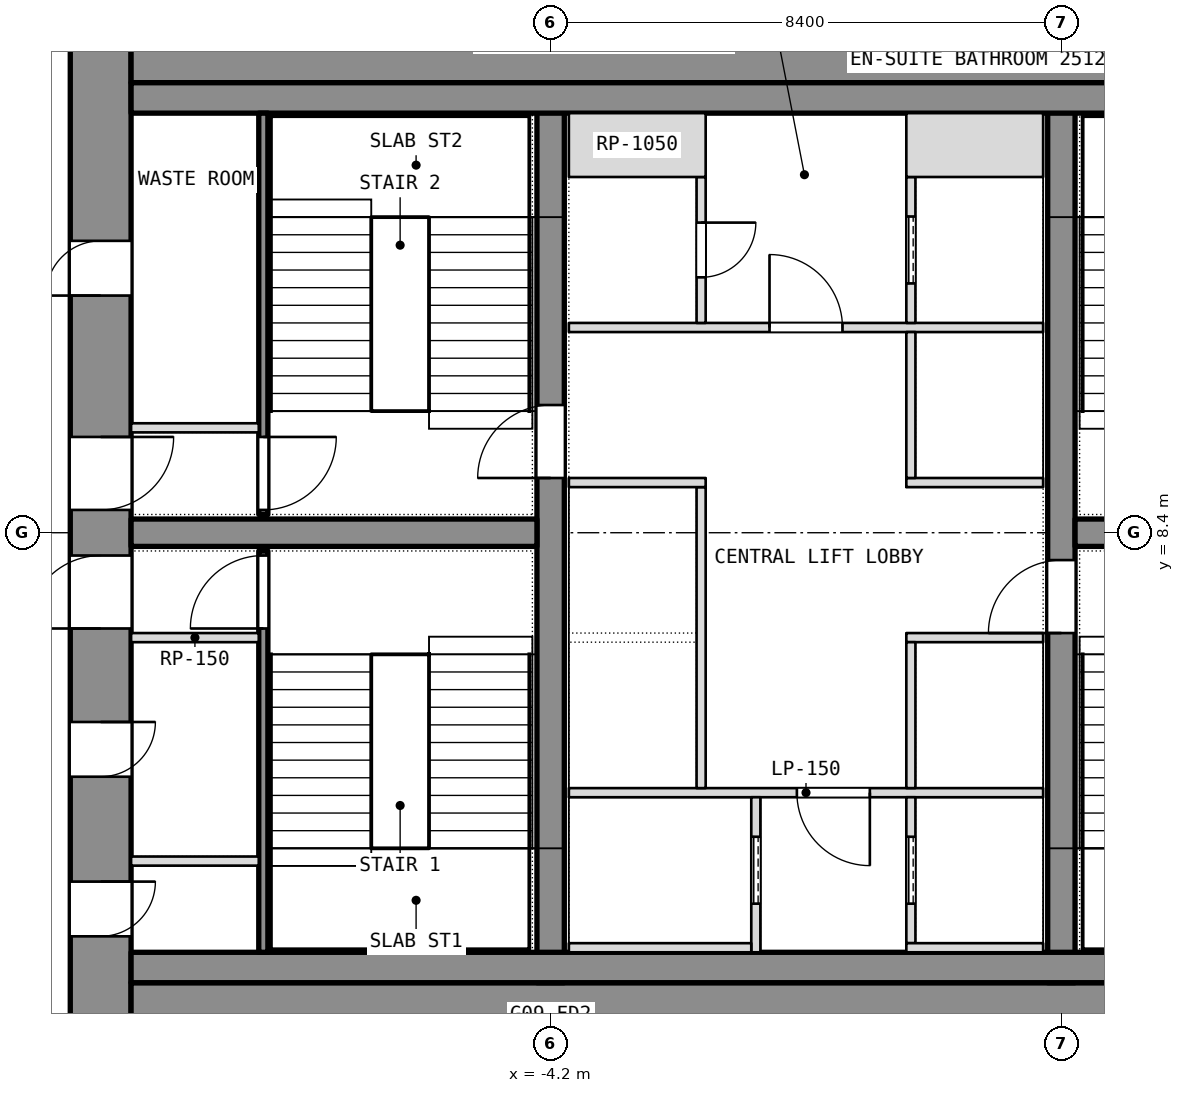
"""IFC4 building model, lengths in metres.
Left out: names, types, materials, properties, quantities, classifications, styles, units other than length and angle.
Written with IfcOpenShell. Run it as: python <this file> out.ifc"""

import sys

from ifc_helpers import new_model, si_unit, direction, frame, frame_2d, origin, place, context, subcontext, project, spatial, rectangle, extrude, element, fill, save


model = new_model("IFC4")
c1 = context("Model", 3, precision=1e-05, world=origin(), true_north=direction((0.0, 1.0)))
c2 = subcontext(c1, "Body", "Model", "MODEL_VIEW")
j1 = project(units=[si_unit("LENGTHUNIT", "METRE"), si_unit("PLANEANGLEUNIT", "RADIAN")], contexts=[c1])
p1 = place(None, origin())
s1 = spatial("IfcSite", under=j1, at=p1, CompositionType="ELEMENT")
p2 = place(p1, origin())
s2 = spatial("IfcBuilding", under=s1, at=p2, CompositionType="ELEMENT")
p3 = place(p2, frame((0.0, 0.0, 115.7)))
s3 = spatial("IfcBuildingStorey", under=s2, at=p3, CompositionType="ELEMENT", Elevation=115.7)
p4 = place(p3, frame((-11.6, 0.0, 0.0), z_axis=(0.0, 0.0, 1.0), x_axis=(0.0, 1.0, 0.0)))
e1 = element("IfcWall", 1, at=p4, inside=s3, PredefinedType="SHEAR", context=c2, shape_type="SweptSolid", body=[
    extrude(rectangle(XDim=16.8, YDim=1.0, at=frame_2d((8.4, 0.0))), origin(), (0.0, 0.0, 1.0), 3.6),
])
p5 = place(p4, frame((1.762, 0.0, 0.0)))
e2 = element("IfcOpeningElement", 2, at=p5, cuts=e1, PredefinedType="OPENING", context=c2, shape_type="SweptSolid", body=[
    extrude(rectangle(XDim=0.9, YDim=2.1, at=frame_2d((0.45, 1.05))), frame((0.0, 0.5, 0.0), z_axis=(0.0, -1.0, 0.0), x_axis=(1.0, 0.0, 0.0)), (0.0, 0.0, 1.0), 1.0),
])
p6 = place(p4, frame((4.387, 0.0, 0.0)))
e3 = element("IfcOpeningElement", 3, at=p6, cuts=e1, PredefinedType="OPENING", context=c2, shape_type="SweptSolid", body=[
    extrude(rectangle(XDim=0.9, YDim=2.1, at=frame_2d((0.45, 1.05))), frame((0.0, 0.5, 0.0), z_axis=(0.0, -1.0, 0.0), x_axis=(1.0, 0.0, 0.0)), (0.0, 0.0, 1.0), 1.0),
])
p7 = place(p4, frame((6.825, 0.0, 0.0)))
e4 = element("IfcOpeningElement", 4, at=p7, cuts=e1, PredefinedType="OPENING", context=c2, shape_type="SweptSolid", body=[
    extrude(rectangle(XDim=1.2, YDim=2.1, at=frame_2d((0.6, 1.05))), frame((0.0, 0.5, 0.0), z_axis=(0.0, -1.0, 0.0), x_axis=(1.0, 0.0, 0.0)), (0.0, 0.0, 1.0), 1.0),
])
p8 = place(p4, frame((12.3, 0.0, 0.0)))
e5 = element("IfcOpeningElement", 5, at=p8, cuts=e1, PredefinedType="OPENING", context=c2, shape_type="SweptSolid", body=[
    extrude(rectangle(XDim=0.9, YDim=2.1, at=frame_2d((0.45, 1.05))), frame((0.0, 0.5, 0.0), z_axis=(0.0, -1.0, 0.0), x_axis=(1.0, 0.0, 0.0)), (0.0, 0.0, 1.0), 1.0),
])
p9 = place(p4, frame((8.775, 0.0, 0.0)))
e6 = element("IfcOpeningElement", 6, at=p9, cuts=e1, PredefinedType="OPENING", context=c2, shape_type="SweptSolid", body=[
    extrude(rectangle(XDim=1.2, YDim=2.1, at=frame_2d((0.6, 1.05))), frame((0.0, 0.5, 0.0), z_axis=(0.0, -1.0, 0.0), x_axis=(1.0, 0.0, 0.0)), (0.0, 0.0, 1.0), 1.0),
])
for number, where, z_axis, x_axis in (
    (7, (-11.1, 0.5, 0.0), (0.0, 0.0, 1.0), (1.0, 0.0, 0.0)),
    (8, (-11.1, 16.3, 0.0), (0.0, 0.0, 1.0), (1.0, 0.0, 0.0)),
):
    element("IfcWall", number, at=place(p3, frame(where, z_axis=z_axis, x_axis=x_axis)), inside=s3, PredefinedType="SHEAR", context=c2, shape_type="SweptSolid", body=[
        extrude(rectangle(XDim=22.2, YDim=1.0, at=frame_2d((11.1, 0.0))), origin(), (0.0, 0.0, 1.0), 3.6),
    ])
p10 = place(p3, frame((-4.2, 1.0, 0.0), z_axis=(0.0, 0.0, 1.0), x_axis=(0.0, 1.0, 0.0)))
e9 = element("IfcWall", 9, at=p10, inside=s3, PredefinedType="SHEAR", context=c2, shape_type="SweptSolid", body=[
    extrude(rectangle(XDim=14.8, YDim=0.45, at=frame_2d((7.4, 0.0))), origin(), (0.0, 0.0, 1.0), 3.6),
])
p11 = place(p10, frame((8.3, 0.0, 0.0)))
e10 = element("IfcOpeningElement", 10, at=p11, cuts=e9, PredefinedType="OPENING", context=c2, shape_type="SweptSolid", body=[
    extrude(rectangle(XDim=1.2, YDim=2.1, at=frame_2d((0.6, 1.05))), frame((0.0, 0.225, 0.0), z_axis=(0.0, -1.0, 0.0), x_axis=(1.0, 0.0, 0.0)), (0.0, 0.0, 1.0), 0.45),
])
p12 = place(p3, frame((4.2, 1.0, 0.0), z_axis=(0.0, 0.0, 1.0), x_axis=(0.0, 1.0, 0.0)))
e11 = element("IfcWall", 11, at=p12, inside=s3, PredefinedType="SHEAR", context=c2, shape_type="SweptSolid", body=[
    extrude(rectangle(XDim=14.8, YDim=0.45, at=frame_2d((7.4, 0.0))), origin(), (0.0, 0.0, 1.0), 3.6),
])
p13 = place(p12, frame((5.75, 0.0, 0.0)))
e12 = element("IfcOpeningElement", 12, at=p13, cuts=e11, PredefinedType="OPENING", context=c2, shape_type="SweptSolid", body=[
    extrude(rectangle(XDim=1.2, YDim=2.1, at=frame_2d((0.6, 1.05))), frame((0.0, 0.225, 0.0), z_axis=(0.0, -1.0, 0.0), x_axis=(1.0, 0.0, 0.0)), (0.0, 0.0, 1.0), 0.45),
])
for number, where, z_axis, x_axis in (
    (13, (-11.1, 8.4, 0.0), (0.0, 0.0, 1.0), (1.0, 0.0, 0.0)),
    (14, (4.425, 8.4, 0.0), (0.0, 0.0, 1.0), (1.0, 0.0, 0.0)),
):
    element("IfcWall", number, at=place(p3, frame(where, z_axis=z_axis, x_axis=x_axis)), inside=s3, PredefinedType="SHEAR", context=c2, shape_type="SweptSolid", body=[
        extrude(rectangle(XDim=6.675, YDim=0.45, at=frame_2d((3.337, 0.0))), origin(), (0.0, 0.0, 1.0), 3.6),
    ])
for number, where, z_axis, x_axis in (
    (15, (-11.1, 1.25, 0.0), (0.0, 0.0, 1.0), (1.0, 0.0, 0.0)),
    (16, (-11.1, 15.55, 0.0), (0.0, 0.0, 1.0), (1.0, 0.0, 0.0)),
):
    element("IfcWall", number, at=place(p3, frame(where, z_axis=z_axis, x_axis=x_axis)), inside=s3, PredefinedType="PARTITIONING", context=c2, shape_type="SweptSolid", body=[
        extrude(rectangle(XDim=22.2, YDim=0.5, at=frame_2d((11.1, 0.0))), origin(), (0.0, 0.0, 1.0), 3.34),
    ])
p14 = place(p3, frame((-8.925, 1.5, 0.0), z_axis=(0.0, 0.0, 1.0), x_axis=(0.0, 1.0, 0.0)))
e17 = element("IfcWall", 17, at=p14, inside=s3, PredefinedType="SHEAR", context=c2, shape_type="SweptSolid", body=[
    extrude(rectangle(XDim=6.6, YDim=0.15, at=frame_2d((3.3, 0.0))), origin(), (0.0, 0.0, 1.0), 3.34),
])
p15 = place(p14, frame((5.325, 0.0, 0.0)))
e18 = element("IfcOpeningElement", 18, at=p15, cuts=e17, PredefinedType="OPENING", context=c2, shape_type="SweptSolid", body=[
    extrude(rectangle(XDim=1.2, YDim=2.1, at=frame_2d((0.6, 1.05))), frame((0.0, 0.075, 0.0), z_axis=(0.0, -1.0, 0.0), x_axis=(1.0, 0.0, 0.0)), (0.0, 0.0, 1.0), 0.15),
])
for number, where, z_axis, x_axis in (
    (19, (-11.1, 6.675, 0.0), (0.0, 0.0, 1.0), (1.0, 0.0, 0.0)),
    (20, (-11.1, 3.0, 0.0), (0.0, 0.0, 1.0), (1.0, 0.0, 0.0)),
):
    element("IfcWall", number, at=place(p3, frame(where, z_axis=z_axis, x_axis=x_axis)), inside=s3, PredefinedType="PARTITIONING", context=c2, shape_type="SweptSolid", body=[
        extrude(rectangle(XDim=2.1, YDim=0.15, at=frame_2d((1.05, 0.0))), origin(), (0.0, 0.0, 1.0), 3.34),
    ])
p16 = place(p3, frame((-8.925, 8.7, 0.0), z_axis=(0.0, 0.0, 1.0), x_axis=(0.0, 1.0, 0.0)))
e21 = element("IfcWall", 21, at=p16, inside=s3, PredefinedType="SHEAR", context=c2, shape_type="SweptSolid", body=[
    extrude(rectangle(XDim=6.6, YDim=0.15, at=frame_2d((3.3, 0.0))), origin(), (0.0, 0.0, 1.0), 3.34),
])
p17 = place(p16, frame((0.075, 0.0, 0.0)))
e22 = element("IfcOpeningElement", 22, at=p17, cuts=e21, PredefinedType="OPENING", context=c2, shape_type="SweptSolid", body=[
    extrude(rectangle(XDim=1.2, YDim=2.1, at=frame_2d((0.6, 1.05))), frame((0.0, 0.075, 0.0), z_axis=(0.0, -1.0, 0.0), x_axis=(1.0, 0.0, 0.0)), (0.0, 0.0, 1.0), 0.15),
])
p18 = place(p3, frame((-11.1, 10.125, 0.0), z_axis=(0.0, 0.0, 1.0), x_axis=(1.0, 0.0, 0.0)))
e23 = element("IfcWall", 23, at=p18, inside=s3, PredefinedType="PARTITIONING", context=c2, shape_type="SweptSolid", body=[
    extrude(rectangle(XDim=2.1, YDim=0.15, at=frame_2d((1.05, 0.0))), origin(), (0.0, 0.0, 1.0), 3.34),
])
p19 = place(p3, frame((-3.9, 4.125, 0.0), z_axis=(0.0, 0.0, 1.0), x_axis=(1.0, 0.0, 0.0)))
e24 = element("IfcWall", 24, at=p19, inside=s3, PredefinedType="PARTITIONING", context=c2, shape_type="SweptSolid", body=[
    extrude(rectangle(XDim=7.8, YDim=0.15, at=frame_2d((3.9, 0.0))), origin(), (0.0, 0.0, 1.0), 3.34),
])
p20 = place(p19, frame((3.75, 0.0, 0.0)))
e25 = element("IfcOpeningElement", 25, at=p20, cuts=e24, PredefinedType="OPENING", context=c2, shape_type="SweptSolid", body=[
    extrude(rectangle(XDim=1.2, YDim=2.1, at=frame_2d((0.6, 1.05))), frame((0.0, 0.075, 0.0), z_axis=(0.0, -1.0, 0.0), x_axis=(1.0, 0.0, 0.0)), (0.0, 0.0, 1.0), 0.15),
])
p21 = place(p3, frame((-3.9, 11.775, 0.0), z_axis=(0.0, 0.0, 1.0), x_axis=(1.0, 0.0, 0.0)))
e26 = element("IfcWall", 26, at=p21, inside=s3, PredefinedType="PARTITIONING", context=c2, shape_type="SweptSolid", body=[
    extrude(rectangle(XDim=7.8, YDim=0.15, at=frame_2d((3.9, 0.0))), origin(), (0.0, 0.0, 1.0), 3.34),
])
p22 = place(p21, frame((3.3, 0.0, 0.0)))
e27 = element("IfcOpeningElement", 27, at=p22, cuts=e26, PredefinedType="OPENING", context=c2, shape_type="SweptSolid", body=[
    extrude(rectangle(XDim=1.2, YDim=2.1, at=frame_2d((0.6, 1.05))), frame((0.0, 0.075, 0.0), z_axis=(0.0, -1.0, 0.0), x_axis=(1.0, 0.0, 0.0)), (0.0, 0.0, 1.0), 0.15),
])
p23 = place(p3, frame((-0.825, 1.5, 0.0), z_axis=(0.0, 0.0, 1.0), x_axis=(0.0, 1.0, 0.0)))
e28 = element("IfcWall", 28, at=p23, inside=s3, PredefinedType="SHEAR", context=c2, shape_type="SweptSolid", body=[
    extrude(rectangle(XDim=2.55, YDim=0.15, at=frame_2d((1.275, 0.0))), origin(), (0.0, 0.0, 1.0), 3.6),
])
p24 = place(p23, frame((0.8, 0.0, 0.0)))
e29 = element("IfcOpeningElement", 29, at=p24, cuts=e28, PredefinedType="OPENING", context=c2, shape_type="SweptSolid", body=[
    extrude(rectangle(XDim=1.1, YDim=2.1, at=frame_2d((0.55, 1.05))), frame((0.0, 0.075, 0.0), z_axis=(0.0, -1.0, 0.0), x_axis=(1.0, 0.0, 0.0)), (0.0, 0.0, 1.0), 0.15),
])
p25 = place(p3, frame((-3.9, 1.575, 0.0), z_axis=(0.0, 0.0, 1.0), x_axis=(1.0, 0.0, 0.0)))
e30 = element("IfcWall", 30, at=p25, inside=s3, PredefinedType="SHEAR", context=c2, shape_type="SweptSolid", body=[
    extrude(rectangle(XDim=3.0, YDim=0.15, at=frame_2d((1.5, 0.0))), origin(), (0.0, 0.0, 1.0), 3.6),
])
p26 = place(p3, frame((-1.725, 4.2, 0.0), z_axis=(0.0, 0.0, 1.0), x_axis=(0.0, 1.0, 0.0)))
e31 = element("IfcWall", 31, at=p26, inside=s3, PredefinedType="SHEAR", context=c2, shape_type="SweptSolid", body=[
    extrude(rectangle(XDim=4.95, YDim=0.15, at=frame_2d((2.475, 0.0))), origin(), (0.0, 0.0, 1.0), 3.6),
])
p27 = place(p3, frame((-3.9, 9.225, 0.0), z_axis=(0.0, 0.0, 1.0), x_axis=(1.0, 0.0, 0.0)))
e32 = element("IfcWall", 32, at=p27, inside=s3, PredefinedType="SHEAR", context=c2, shape_type="SweptSolid", body=[
    extrude(rectangle(XDim=2.25, YDim=0.15, at=frame_2d((1.125, 0.0))), origin(), (0.0, 0.0, 1.0), 3.6),
])
p28 = place(p3, frame((-1.725, 11.85, 0.0), z_axis=(0.0, 0.0, 1.0), x_axis=(0.0, 1.0, 0.0)))
e33 = element("IfcWall", 33, at=p28, inside=s3, PredefinedType="PARTITIONING", context=c2, shape_type="SweptSolid", body=[
    extrude(rectangle(XDim=2.4, YDim=0.15, at=frame_2d((1.2, 0.0))), origin(), (0.0, 0.0, 1.0), 3.34),
])
p29 = place(p28, frame((0.75, 0.0, 0.0)))
e34 = element("IfcOpeningElement", 34, at=p29, cuts=e33, PredefinedType="OPENING", context=c2, shape_type="SweptSolid", body=[
    extrude(rectangle(XDim=0.9, YDim=2.1, at=frame_2d((0.45, 1.05))), frame((0.0, 0.075, 0.0), z_axis=(0.0, -1.0, 0.0), x_axis=(1.0, 0.0, 0.0)), (0.0, 0.0, 1.0), 0.15),
])
p30 = place(p3, frame((-3.9, 14.775, 0.0), z_axis=(0.0, 0.0, 1.0), x_axis=(1.0, 0.0, 0.0)))
e35 = element("IfcWall", 35, at=p30, inside=s3, PredefinedType="PARTITIONING", context=c2, shape_type="SweptSolid", body=[
    extrude(rectangle(XDim=2.25, YDim=1.05, at=frame_2d((1.125, 0.0))), origin(), (0.0, 0.0, 1.0), 3.34),
])
p31 = place(p3, frame((1.725, 1.65, 0.0), z_axis=(0.0, 0.0, 1.0), x_axis=(0.0, 1.0, 0.0)))
e36 = element("IfcWall", 36, at=p31, inside=s3, PredefinedType="SHEAR", context=c2, shape_type="SweptSolid", body=[
    extrude(rectangle(XDim=2.4, YDim=0.15, at=frame_2d((1.2, 0.0))), origin(), (0.0, 0.0, 1.0), 3.6),
])
p32 = place(p31, frame((0.65, 0.0, 0.0)))
e37 = element("IfcOpeningElement", 37, at=p32, cuts=e36, PredefinedType="OPENING", context=c2, shape_type="SweptSolid", body=[
    extrude(rectangle(XDim=1.1, YDim=2.1, at=frame_2d((0.55, 1.05))), frame((0.0, 0.075, 0.0), z_axis=(0.0, -1.0, 0.0), x_axis=(1.0, 0.0, 0.0)), (0.0, 0.0, 1.0), 0.15),
])
p33 = place(p3, frame((1.65, 1.575, 0.0), z_axis=(0.0, 0.0, 1.0), x_axis=(1.0, 0.0, 0.0)))
e38 = element("IfcWall", 38, at=p33, inside=s3, PredefinedType="SHEAR", context=c2, shape_type="SweptSolid", body=[
    extrude(rectangle(XDim=2.25, YDim=0.15, at=frame_2d((1.125, 0.0))), origin(), (0.0, 0.0, 1.0), 3.6),
])
p34 = place(p3, frame((1.725, 11.85, 0.0), z_axis=(0.0, 0.0, 1.0), x_axis=(0.0, 1.0, 0.0)))
e39 = element("IfcWall", 39, at=p34, inside=s3, PredefinedType="SHEAR", context=c2, shape_type="SweptSolid", body=[
    extrude(rectangle(XDim=2.4, YDim=0.15, at=frame_2d((1.2, 0.0))), origin(), (0.0, 0.0, 1.0), 3.6),
])
p35 = place(p34, frame((0.65, 0.0, 0.0)))
e40 = element("IfcOpeningElement", 40, at=p35, cuts=e39, PredefinedType="OPENING", context=c2, shape_type="SweptSolid", body=[
    extrude(rectangle(XDim=1.1, YDim=2.1, at=frame_2d((0.55, 1.05))), frame((0.0, 0.075, 0.0), z_axis=(0.0, -1.0, 0.0), x_axis=(1.0, 0.0, 0.0)), (0.0, 0.0, 1.0), 0.15),
])
p36 = place(p3, frame((1.65, 14.775, 0.0), z_axis=(0.0, 0.0, 1.0), x_axis=(1.0, 0.0, 0.0)))
e41 = element("IfcWall", 41, at=p36, inside=s3, PredefinedType="SHEAR", context=c2, shape_type="SweptSolid", body=[
    extrude(rectangle(XDim=2.25, YDim=1.05, at=frame_2d((1.125, 0.0))), origin(), (0.0, 0.0, 1.0), 3.6),
])
for number, where, z_axis, x_axis in (
    (42, (1.65, 6.675, 0.0), (0.0, 0.0, 1.0), (1.0, 0.0, 0.0)),
    (43, (1.65, 9.225, 0.0), (0.0, 0.0, 1.0), (1.0, 0.0, 0.0)),
):
    element("IfcWall", number, at=place(p3, frame(where, z_axis=z_axis, x_axis=x_axis)), inside=s3, PredefinedType="SHEAR", context=c2, shape_type="SweptSolid", body=[
        extrude(rectangle(XDim=2.25, YDim=0.15, at=frame_2d((1.125, 0.0))), origin(), (0.0, 0.0, 1.0), 3.6),
    ])
p37 = place(p3, frame((1.725, 4.2, 0.0), z_axis=(0.0, 0.0, 1.0), x_axis=(0.0, 1.0, 0.0)))
e44 = element("IfcWall", 44, at=p37, inside=s3, PredefinedType="SHEAR", context=c2, shape_type="SweptSolid", body=[
    extrude(rectangle(XDim=2.4, YDim=0.15, at=frame_2d((1.2, 0.0))), origin(), (0.0, 0.0, 1.0), 3.6),
])
p38 = place(p3, frame((1.725, 9.3, 0.0), z_axis=(0.0, 0.0, 1.0), x_axis=(0.0, 1.0, 0.0)))
e45 = element("IfcWall", 45, at=p38, inside=s3, PredefinedType="SHEAR", context=c2, shape_type="SweptSolid", body=[
    extrude(rectangle(XDim=2.4, YDim=0.15, at=frame_2d((1.2, 0.0))), origin(), (0.0, 0.0, 1.0), 3.6),
])
p39 = place(p5, origin())
e46 = element("IfcDoor", 46, at=p39, inside=s3, OperationType="SINGLE_SWING_LEFT", PredefinedType="DOOR", context=c2, shape_type="SweptSolid", body=[
    extrude(rectangle(XDim=0.9, YDim=2.1, at=frame_2d((0.45, 1.05))), frame((0.0, 0.025, 0.0), z_axis=(0.0, -1.0, 0.0), x_axis=(1.0, 0.0, 0.0)), (0.0, 0.0, 1.0), 0.05),
])
fill(e2, e46)
p40 = place(p6, origin())
e47 = element("IfcDoor", 47, at=p40, inside=s3, OperationType="SINGLE_SWING_LEFT", PredefinedType="DOOR", context=c2, shape_type="SweptSolid", body=[
    extrude(rectangle(XDim=0.9, YDim=2.1, at=frame_2d((0.45, 1.05))), frame((0.0, 0.025, 0.0), z_axis=(0.0, -1.0, 0.0), x_axis=(1.0, 0.0, 0.0)), (0.0, 0.0, 1.0), 0.05),
])
fill(e3, e47)
p41 = place(p7, origin())
e48 = element("IfcDoor", 48, at=p41, inside=s3, OperationType="SINGLE_SWING_LEFT", PredefinedType="DOOR", context=c2, shape_type="SweptSolid", body=[
    extrude(rectangle(XDim=1.2, YDim=2.1, at=frame_2d((0.6, 1.05))), frame((0.0, 0.025, 0.0), z_axis=(0.0, -1.0, 0.0), x_axis=(1.0, 0.0, 0.0)), (0.0, 0.0, 1.0), 0.05),
])
fill(e4, e48)
p42 = place(p15, origin())
e49 = element("IfcDoor", 49, at=p42, inside=s3, OperationType="SINGLE_SWING_LEFT", PredefinedType="DOOR", context=c2, shape_type="SweptSolid", body=[
    extrude(rectangle(XDim=1.2, YDim=2.1, at=frame_2d((0.6, 1.05))), frame((0.0, 0.025, 0.0), z_axis=(0.0, -1.0, 0.0), x_axis=(1.0, 0.0, 0.0)), (0.0, 0.0, 1.0), 0.05),
])
fill(e18, e49)
p43 = place(p8, origin())
e50 = element("IfcDoor", 50, at=p43, inside=s3, OperationType="SINGLE_SWING_LEFT", PredefinedType="DOOR", context=c2, shape_type="SweptSolid", body=[
    extrude(rectangle(XDim=0.9, YDim=2.1, at=frame_2d((0.45, 1.05))), frame((0.0, 0.025, 0.0), z_axis=(0.0, -1.0, 0.0), x_axis=(1.0, 0.0, 0.0)), (0.0, 0.0, 1.0), 0.05),
])
fill(e5, e50)
p44 = place(p9, origin())
e51 = element("IfcDoor", 51, at=p44, inside=s3, OperationType="SINGLE_SWING_LEFT", PredefinedType="DOOR", context=c2, shape_type="SweptSolid", body=[
    extrude(rectangle(XDim=1.2, YDim=2.1, at=frame_2d((0.6, 1.05))), frame((0.0, 0.025, 0.0), z_axis=(0.0, -1.0, 0.0), x_axis=(1.0, 0.0, 0.0)), (0.0, 0.0, 1.0), 0.05),
])
fill(e6, e51)
p45 = place(p17, origin())
e52 = element("IfcDoor", 52, at=p45, inside=s3, OperationType="SINGLE_SWING_LEFT", PredefinedType="DOOR", context=c2, shape_type="SweptSolid", body=[
    extrude(rectangle(XDim=1.2, YDim=2.1, at=frame_2d((0.6, 1.05))), frame((0.0, 0.025, 0.0), z_axis=(0.0, -1.0, 0.0), x_axis=(1.0, 0.0, 0.0)), (0.0, 0.0, 1.0), 0.05),
])
fill(e22, e52)
p46 = place(p24, origin())
e53 = element("IfcDoor", 53, at=p46, inside=s3, OperationType="SLIDING_TO_LEFT", PredefinedType="DOOR", context=c2, shape_type="SweptSolid", body=[
    extrude(rectangle(XDim=1.1, YDim=2.1, at=frame_2d((0.55, 1.05))), frame((0.0, 0.025, 0.0), z_axis=(0.0, -1.0, 0.0), x_axis=(1.0, 0.0, 0.0)), (0.0, 0.0, 1.0), 0.05),
])
fill(e29, e53)
p47 = place(p32, origin())
e54 = element("IfcDoor", 54, at=p47, inside=s3, OperationType="SLIDING_TO_LEFT", PredefinedType="DOOR", context=c2, shape_type="SweptSolid", body=[
    extrude(rectangle(XDim=1.1, YDim=2.1, at=frame_2d((0.55, 1.05))), frame((0.0, 0.025, 0.0), z_axis=(0.0, -1.0, 0.0), x_axis=(1.0, 0.0, 0.0)), (0.0, 0.0, 1.0), 0.05),
])
fill(e37, e54)
p48 = place(p35, origin())
e55 = element("IfcDoor", 55, at=p48, inside=s3, OperationType="SLIDING_TO_LEFT", PredefinedType="DOOR", context=c2, shape_type="SweptSolid", body=[
    extrude(rectangle(XDim=1.1, YDim=2.1, at=frame_2d((0.55, 1.05))), frame((0.0, 0.025, 0.0), z_axis=(0.0, -1.0, 0.0), x_axis=(1.0, 0.0, 0.0)), (0.0, 0.0, 1.0), 0.05),
])
fill(e40, e55)
p49 = place(p20, origin())
e56 = element("IfcDoor", 56, at=p49, inside=s3, OperationType="SINGLE_SWING_LEFT", PredefinedType="DOOR", context=c2, shape_type="SweptSolid", body=[
    extrude(rectangle(XDim=1.2, YDim=2.1, at=frame_2d((0.6, 1.05))), frame((0.0, 0.025, 0.0), z_axis=(0.0, -1.0, 0.0), x_axis=(1.0, 0.0, 0.0)), (0.0, 0.0, 1.0), 0.05),
])
fill(e25, e56)
p50 = place(p22, origin())
e57 = element("IfcDoor", 57, at=p50, inside=s3, OperationType="SINGLE_SWING_LEFT", PredefinedType="DOOR", context=c2, shape_type="SweptSolid", body=[
    extrude(rectangle(XDim=1.2, YDim=2.1, at=frame_2d((0.6, 1.05))), frame((0.0, 0.025, 0.0), z_axis=(0.0, -1.0, 0.0), x_axis=(1.0, 0.0, 0.0)), (0.0, 0.0, 1.0), 0.05),
])
fill(e27, e57)
p51 = place(p29, origin())
e58 = element("IfcDoor", 58, at=p51, inside=s3, OperationType="SINGLE_SWING_LEFT", PredefinedType="DOOR", context=c2, shape_type="SweptSolid", body=[
    extrude(rectangle(XDim=0.9, YDim=2.1, at=frame_2d((0.45, 1.05))), frame((0.0, 0.025, 0.0), z_axis=(0.0, -1.0, 0.0), x_axis=(1.0, 0.0, 0.0)), (0.0, 0.0, 1.0), 0.05),
])
fill(e34, e58)
p52 = place(p11, origin())
e59 = element("IfcDoor", 59, at=p52, inside=s3, OperationType="SINGLE_SWING_LEFT", PredefinedType="DOOR", context=c2, shape_type="SweptSolid", body=[
    extrude(rectangle(XDim=1.2, YDim=2.1, at=frame_2d((0.6, 1.05))), frame((0.0, 0.025, 0.0), z_axis=(0.0, -1.0, 0.0), x_axis=(1.0, 0.0, 0.0)), (0.0, 0.0, 1.0), 0.05),
])
fill(e10, e59)
p53 = place(p13, origin())
e60 = element("IfcDoor", 60, at=p53, inside=s3, OperationType="SINGLE_SWING_LEFT", PredefinedType="DOOR", context=c2, shape_type="SweptSolid", body=[
    extrude(rectangle(XDim=1.2, YDim=2.1, at=frame_2d((0.6, 1.05))), frame((0.0, 0.025, 0.0), z_axis=(0.0, -1.0, 0.0), x_axis=(1.0, 0.0, 0.0)), (0.0, 0.0, 1.0), 0.05),
])
fill(e12, e60)
save(model, sys.argv[1])
